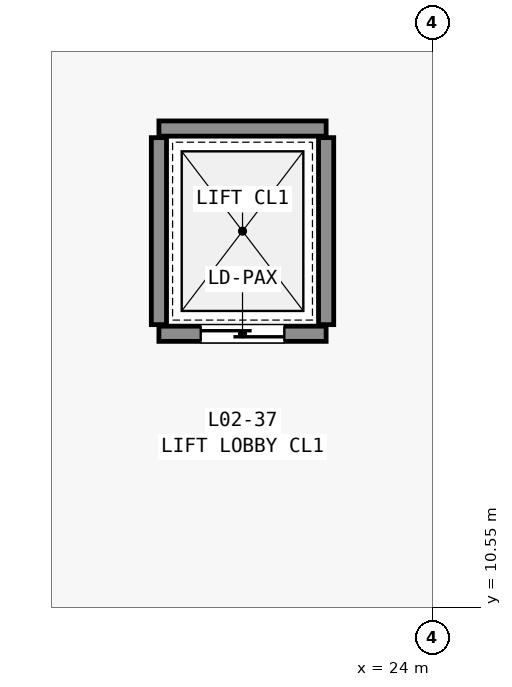
"""IFC4 building model, lengths in metres.
Left out: names, types, materials, properties, quantities, classifications, styles, units other than length and angle.
Written with IfcOpenShell. Run it as: python <this file> out.ifc"""

import sys

from ifc_helpers import new_model, si_unit, direction, frame, frame_2d, origin, place, context, subcontext, project, spatial, rectangle, extrude, element, fill, save


model = new_model("IFC4")
c1 = context("Model", 3, precision=1e-05, world=origin(), true_north=direction((0.0, 1.0)))
c2 = subcontext(c1, "Body", "Model", "MODEL_VIEW")
j1 = project(units=[si_unit("LENGTHUNIT", "METRE"), si_unit("PLANEANGLEUNIT", "RADIAN")], contexts=[c1])
p1 = place(None, origin())
s1 = spatial("IfcSite", under=j1, at=p1, CompositionType="ELEMENT")
p2 = place(p1, origin())
s2 = spatial("IfcBuilding", under=s1, at=p2, CompositionType="ELEMENT")
p3 = place(p2, frame((0.0, 0.0, 11.4)))
s3 = spatial("IfcBuildingStorey", under=s2, at=p3, CompositionType="ELEMENT", Elevation=11.4)
p4 = place(p3, frame((20.4, 14.15, 0.0), z_axis=(0.0, 0.0, 1.0), x_axis=(1.0, 0.0, 0.0)))
e1 = element("IfcWall", 1, at=p4, inside=s3, PredefinedType="STANDARD", context=c2, shape_type="SweptSolid", body=[
    extrude(rectangle(XDim=2.2, YDim=0.2, at=frame_2d((1.1, 0.0))), origin(), (0.0, 0.0, 1.0), 4.45),
])
p5 = place(p4, frame((0.55, 0.0, 0.0)))
e2 = element("IfcOpeningElement", 2, at=p5, cuts=e1, PredefinedType="OPENING", context=c2, shape_type="SweptSolid", body=[
    extrude(rectangle(XDim=1.1, YDim=2.15, at=frame_2d((0.55, 1.075))), frame((0.0, 0.11, 0.0), z_axis=(0.0, -1.0, 0.0), x_axis=(1.0, 0.0, 0.0)), (0.0, 0.0, 1.0), 0.22),
])
p6 = place(p3, frame((20.4, 16.85, 0.0), z_axis=(0.0, 0.0, 1.0), x_axis=(1.0, 0.0, 0.0)))
e3 = element("IfcWall", 3, at=p6, inside=s3, PredefinedType="STANDARD", context=c2, shape_type="SweptSolid", body=[
    extrude(rectangle(XDim=2.2, YDim=0.2, at=frame_2d((1.1, 0.0))), origin(), (0.0, 0.0, 1.0), 4.45),
])
for number, where, z_axis, x_axis in (
    (4, (20.4, 14.27, 0.0), (0.0, 0.0, 1.0), (0.0, 1.0, 0.0)),
    (5, (22.6, 14.27, 0.0), (0.0, 0.0, 1.0), (0.0, 1.0, 0.0)),
):
    element("IfcWall", number, at=place(p3, frame(where, z_axis=z_axis, x_axis=x_axis)), inside=s3, PredefinedType="STANDARD", context=c2, shape_type="SweptSolid", body=[
        extrude(rectangle(XDim=2.46, YDim=0.2, at=frame_2d((1.23, 0.0))), origin(), (0.0, 0.0, 1.0), 4.45),
    ])
p7 = place(p5, origin())
e6 = element("IfcDoor", 6, at=p7, inside=s3, OperationType="SLIDING_TO_LEFT", PredefinedType="DOOR", context=c2, shape_type="SweptSolid", body=[
    extrude(rectangle(XDim=1.1, YDim=2.15, at=frame_2d((0.55, 1.075))), frame((0.0, 0.025, 0.0), z_axis=(0.0, -1.0, 0.0), x_axis=(1.0, 0.0, 0.0)), (0.0, 0.0, 1.0), 0.05),
])
fill(e2, e6)
save(model, sys.argv[1])
